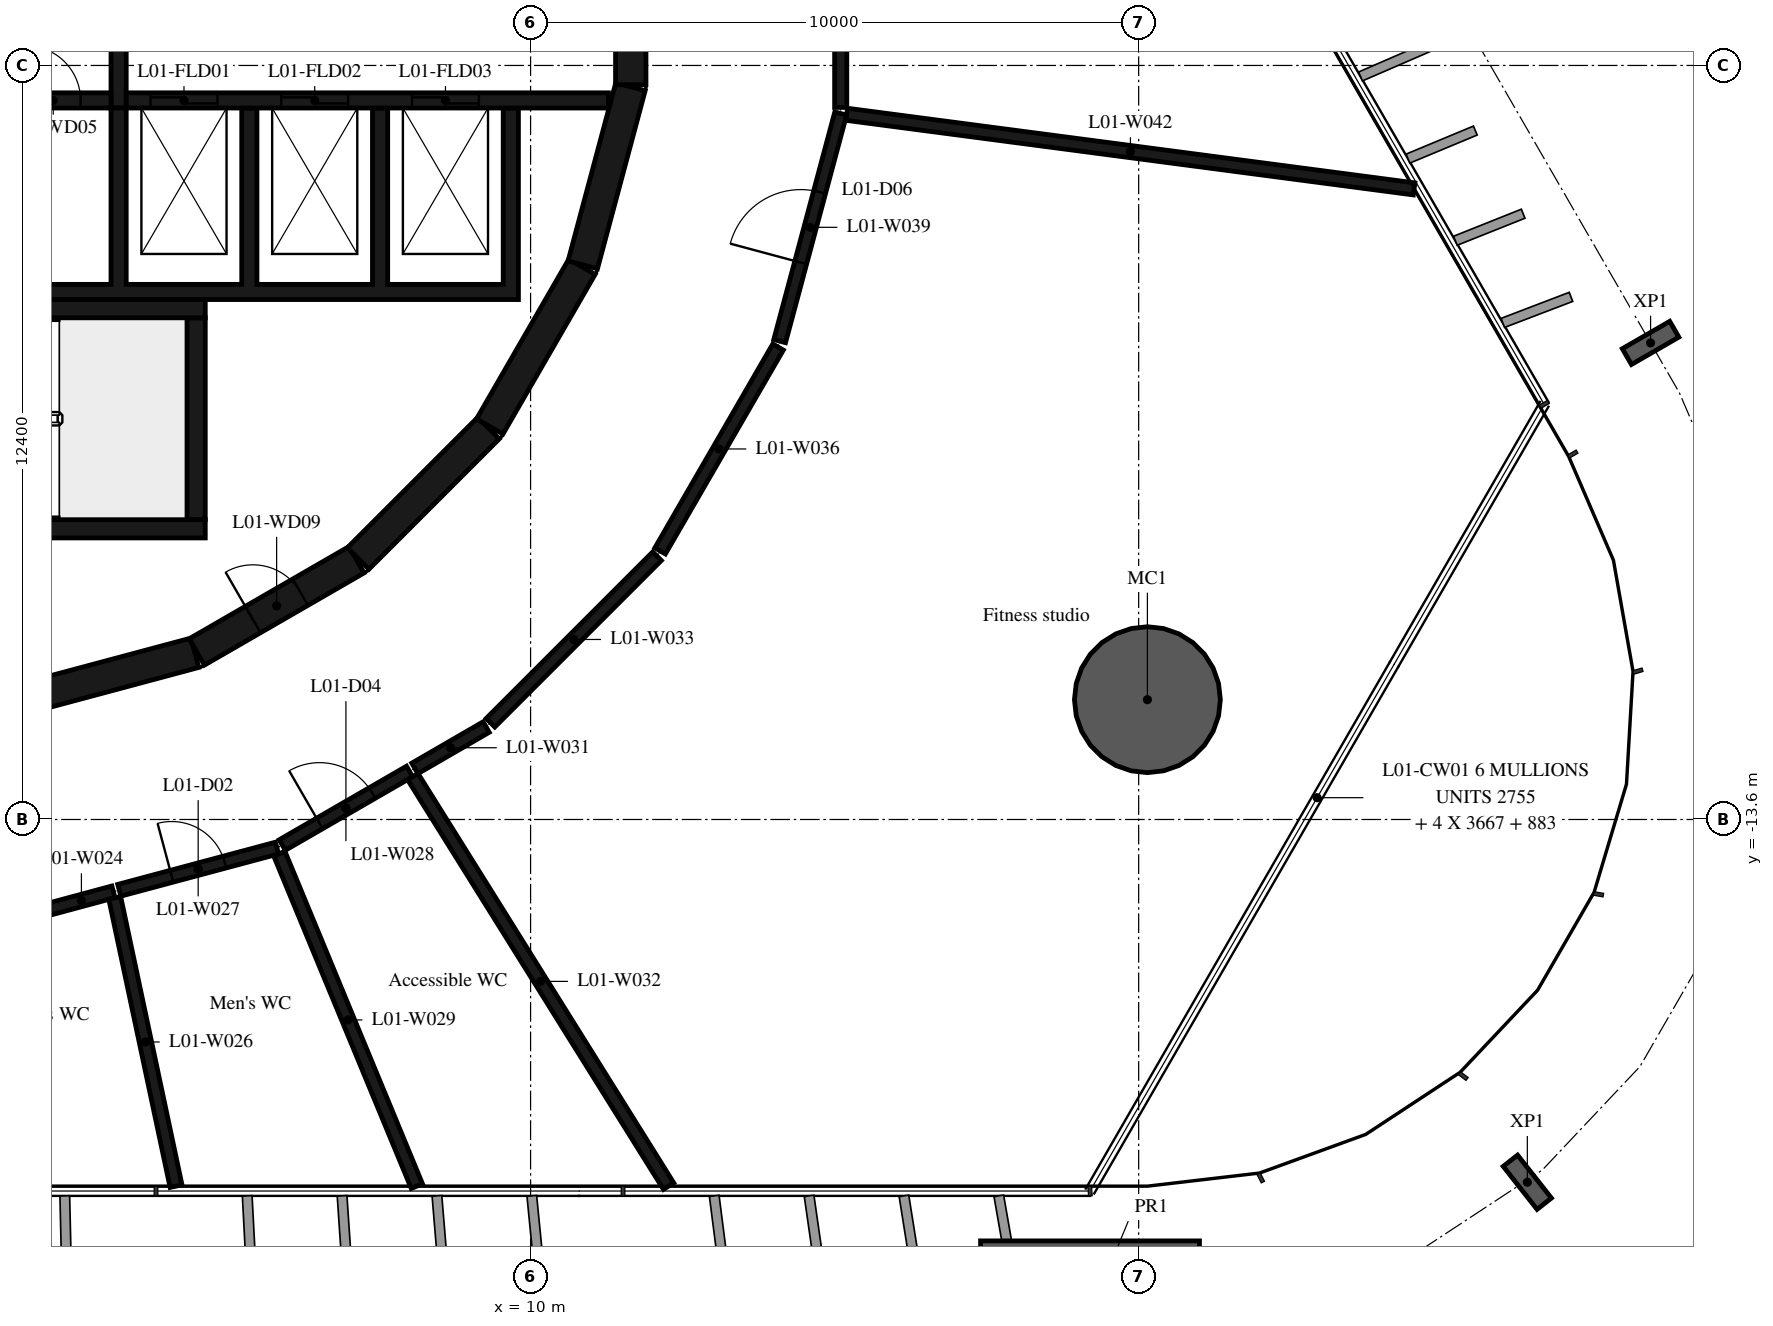
"""IFC4 building model, lengths in metres.
Left out: names, types, materials, properties, quantities, classifications, styles, units other than length and angle.
Written with IfcOpenShell. Run it as: python <this file> out.ifc"""

import sys

from ifc_helpers import new_model, si_unit, direction, frame, frame_2d, origin, origin_2d, place, context, subcontext, project, spatial, polyline, rectangle, hollow_circle, i_section, outline, extrude, element, fill, save


model = new_model("IFC4")
c1 = context("Model", 3, precision=1e-05, world=origin(), true_north=direction((0.0, 1.0)))
c2 = subcontext(c1, "Body", "Model", "MODEL_VIEW")
j1 = project(units=[si_unit("LENGTHUNIT", "METRE"), si_unit("PLANEANGLEUNIT", "RADIAN")], contexts=[c1])
p1 = place(None, origin())
s1 = spatial("IfcSite", under=j1, at=p1, CompositionType="ELEMENT")
p2 = place(p1, origin())
s2 = spatial("IfcBuilding", under=s1, at=p2, CompositionType="ELEMENT")
p3 = place(p2, frame((0.0, 0.0, 9.0)))
s3 = spatial("IfcBuildingStorey", under=s2, at=p3, CompositionType="ELEMENT", Elevation=9.0)
p4 = place(p3, frame((20.144, -11.63, -0.38), z_axis=(0.0, 0.0, 1.0), x_axis=(1.0, 0.0, 0.0)))
e1 = element("IfcColumn", 1, at=p4, inside=s3, PredefinedType="COLUMN", context=c2, shape_type="SweptSolid", body=[
    extrude(hollow_circle(Radius=1.2, WallThickness=0.06, at=origin_2d()), origin(), (0.0, 0.0, 1.0), 4.8),
])
for number, where, z_axis, x_axis in (
    (2, (26.392, -19.565, -0.38), (0.0, 0.0, 1.0), (-0.786, -0.619, 0.0)),
    (3, (28.419, -5.763, -0.38), (0.0, 0.0, 1.0), (0.5, -0.866, 0.0)),
):
    element("IfcColumn", number, at=place(p3, frame(where, z_axis=z_axis, x_axis=x_axis)), inside=s3, PredefinedType="COLUMN", context=c2, shape_type="SweptSolid", body=[
        extrude(i_section(OverallWidth=0.3, OverallDepth=0.9, WebThickness=0.019, FlangeThickness=0.035, FilletRadius=0.03, at=origin_2d()), origin(), (0.0, 0.0, 1.0), 4.8),
    ])
p5 = place(p3, frame((19.2, -21.73, -0.38), z_axis=(0.0, 0.0, 1.0), x_axis=(1.0, 0.0, 0.0)))
e4 = element("IfcColumn", 4, at=p5, inside=s3, PredefinedType="COLUMN", context=c2, shape_type="SweptSolid", body=[
    extrude(rectangle(XDim=3.6, YDim=2.4, at=origin_2d()), origin(), (0.0, 0.0, 1.0), 4.8),
])
p6 = place(p3, frame((1.55, -11.643, 0.0), z_axis=(0.0, 0.0, 1.0), x_axis=(0.965948410781, 0.258734743916, 0.0)))
e5 = element("IfcWall", 5, at=p6, inside=s3, PredefinedType="SHEAR", context=c2, shape_type="SweptSolid", body=[
    extrude(rectangle(XDim=3.033, YDim=0.5, at=frame_2d((1.516, 0.0))), origin(), (0.0, 0.0, 1.0), 4.42),
])
p7 = place(p3, frame((4.51, -10.845, 0.0), z_axis=(0.0, 0.0, 1.0), x_axis=(0.865975092491, 0.500087131594, 0.0)))
e6 = element("IfcWall", 6, at=p7, inside=s3, PredefinedType="SHEAR", context=c2, shape_type="SweptSolid", body=[
    extrude(rectangle(XDim=3.033, YDim=0.5, at=frame_2d((1.516, 0.0))), origin(), (0.0, 0.0, 1.0), 4.42),
])
p8 = place(p7, frame((1.066, 0.0, 0.0)))
e7 = element("IfcOpeningElement", 7, at=p8, cuts=e6, PredefinedType="OPENING", context=c2, shape_type="SweptSolid", body=[
    extrude(rectangle(XDim=0.9, YDim=2.1, at=frame_2d((0.45, 1.05))), frame((0.0, 0.26, 0.0), z_axis=(0.0, -1.0, 0.0), x_axis=(1.0, 0.0, 0.0)), (0.0, 0.0, 1.0), 0.52),
])
p9 = place(p3, frame((7.164, -9.308, 0.0), z_axis=(0.0, 0.0, 1.0), x_axis=(0.707106781187, 0.707106781187, 0.0)))
e8 = element("IfcWall", 8, at=p9, inside=s3, PredefinedType="SHEAR", context=c2, shape_type="SweptSolid", body=[
    extrude(rectangle(XDim=3.032, YDim=0.5, at=frame_2d((1.516, 0.0))), origin(), (0.0, 0.0, 1.0), 4.42),
])
for number, where, z_axis, x_axis in (
    (9, (9.329, -7.137, 0.0), (0.0, 0.0, 1.0), (0.5, 0.866, 0.0)),
    (10, (10.858, -4.479, 0.0), (0.0, 0.0, 1.0), (0.259, 0.966, 0.0)),
):
    element("IfcWall", number, at=place(p3, frame(where, z_axis=z_axis, x_axis=x_axis)), inside=s3, PredefinedType="SHEAR", context=c2, shape_type="SweptSolid", body=[
        extrude(rectangle(XDim=3.033, YDim=0.5, at=frame_2d((1.516, 0.0))), origin(), (0.0, 0.0, 1.0), 4.42),
    ])
p10 = place(p3, frame((11.647, -1.516, 0.0), z_axis=(0.0, 0.0, 1.0), x_axis=(0.0, 1.0, 0.0)))
e11 = element("IfcWall", 11, at=p10, inside=s3, PredefinedType="SHEAR", context=c2, shape_type="SweptSolid", body=[
    extrude(rectangle(XDim=3.033, YDim=0.5, at=frame_2d((1.516, 0.0))), origin(), (0.0, 0.0, 1.0), 4.42),
])
p11 = place(p10, frame((0.616, 0.0, 0.0)))
e12 = element("IfcOpeningElement", 12, at=p11, cuts=e11, PredefinedType="OPENING", context=c2, shape_type="SweptSolid", body=[
    extrude(rectangle(XDim=1.8, YDim=2.1, at=frame_2d((0.9, 1.05))), frame((0.0, 0.26, 0.0), z_axis=(0.0, -1.0, 0.0), x_axis=(1.0, 0.0, 0.0)), (0.0, 0.0, 1.0), 0.52),
])
p12 = place(p3, frame((-2.4, -5.2, 0.0), z_axis=(0.0, 0.0, 1.0), x_axis=(1.0, 0.0, 0.0)))
e13 = element("IfcWall", 13, at=p12, inside=s3, PredefinedType="SHEAR", context=c2, shape_type="SweptSolid", body=[
    extrude(rectangle(XDim=7.05, YDim=0.3, at=frame_2d((3.525, 0.0))), origin(), (0.0, 0.0, 1.0), 4.42),
])
p13 = place(p3, frame((4.5, -8.67, 0.0), z_axis=(0.0, 0.0, 1.0), x_axis=(0.0, 1.0, 0.0)))
e14 = element("IfcWall", 14, at=p13, inside=s3, PredefinedType="SHEAR", context=c2, shape_type="SweptSolid", body=[
    extrude(rectangle(XDim=3.32, YDim=0.3, at=frame_2d((1.66, 0.0))), origin(), (0.0, 0.0, 1.0), 4.42),
])
p14 = place(p3, frame((0.1, -8.82, 0.0), z_axis=(0.0, 0.0, 1.0), x_axis=(1.0, 0.0, 0.0)))
e15 = element("IfcWall", 15, at=p14, inside=s3, PredefinedType="SHEAR", context=c2, shape_type="SweptSolid", body=[
    extrude(rectangle(XDim=4.55, YDim=0.3, at=frame_2d((2.275, 0.0))), origin(), (0.0, 0.0, 1.0), 4.42),
])
p15 = place(p3, origin())
e16 = element("IfcWall", 16, at=p15, inside=s3, PredefinedType="SHEAR", context=c2, shape_type="SweptSolid", body=[
    extrude(outline(polyline([(9.8, -5.05), (9.8, -4.8), (9.8, -1.9), (9.55, -1.9), (9.55, -4.8), (7.65, -4.8), (7.65, -1.9), (7.4, -1.9), (7.4, -4.8), (5.5, -4.8), (5.5, -1.9), (5.25, -1.9), (5.25, -4.8), (3.35, -4.8), (3.35, -1.9), (3.1, -1.9), (3.1, -4.8), (1.2, -4.8), (1.2, -1.9), (0.95, -1.9), (0.95, -4.8), (-0.95, -4.8), (-0.95, -1.9), (-1.2, -1.9), (-1.2, -4.8), (-5.25, -4.8), (-5.25, -1.9), (-5.5, -1.9), (-5.5, -4.8), (-7.4, -4.8), (-7.4, -1.9), (-7.65, -1.9), (-7.65, -4.8), (-9.55, -4.8), (-9.55, -1.9), (-9.8, -1.9), (-9.8, -4.8), (-9.8, -5.05), (9.8, -5.05)])), origin(), (0.0, 0.0, 1.0), 4.42),
])
p16 = place(p3, frame((-11.28, -1.775, 0.0), z_axis=(0.0, 0.0, 1.0), x_axis=(1.0, 0.0, 0.0)))
e17 = element("IfcWall", 17, at=p16, inside=s3, PredefinedType="SHEAR", context=c2, shape_type="SweptSolid", body=[
    extrude(rectangle(XDim=14.38, YDim=0.25, at=frame_2d((7.19, 0.0))), origin(), (0.0, 0.0, 1.0), 4.42),
])
p17 = place(p16, frame((7.605, 0.0, 0.0)))
e18 = element("IfcOpeningElement", 18, at=p17, cuts=e17, PredefinedType="OPENING", context=c2, shape_type="SweptSolid", body=[
    extrude(rectangle(XDim=0.9, YDim=2.1, at=frame_2d((0.45, 1.05))), frame((0.0, 0.135, 0.0), z_axis=(0.0, -1.0, 0.0), x_axis=(1.0, 0.0, 0.0)), (0.0, 0.0, 1.0), 0.27),
])
p18 = place(p16, frame((10.83, 0.0, 0.0)))
e19 = element("IfcOpeningElement", 19, at=p18, cuts=e17, PredefinedType="OPENING", context=c2, shape_type="SweptSolid", body=[
    extrude(rectangle(XDim=0.9, YDim=2.1, at=frame_2d((0.45, 1.05))), frame((0.0, 0.135, 0.0), z_axis=(0.0, -1.0, 0.0), x_axis=(1.0, 0.0, 0.0)), (0.0, 0.0, 1.0), 0.27),
])
p19 = place(p16, frame((12.98, 0.0, 0.0)))
e20 = element("IfcOpeningElement", 20, at=p19, cuts=e17, PredefinedType="OPENING", context=c2, shape_type="SweptSolid", body=[
    extrude(rectangle(XDim=0.9, YDim=2.1, at=frame_2d((0.45, 1.05))), frame((0.0, 0.135, 0.0), z_axis=(0.0, -1.0, 0.0), x_axis=(1.0, 0.0, 0.0)), (0.0, 0.0, 1.0), 0.27),
])
p20 = place(p3, frame((3.35, -1.775, 0.0), z_axis=(0.0, 0.0, 1.0), x_axis=(1.0, 0.0, 0.0)))
e21 = element("IfcWall", 21, at=p20, inside=s3, PredefinedType="SHEAR", context=c2, shape_type="SweptSolid", body=[
    extrude(rectangle(XDim=7.93, YDim=0.25, at=frame_2d((3.965, 0.0))), origin(), (0.0, 0.0, 1.0), 4.42),
])
p21 = place(p20, frame((0.4, 0.0, 0.0)))
e22 = element("IfcOpeningElement", 22, at=p21, cuts=e21, PredefinedType="OPENING", context=c2, shape_type="SweptSolid", body=[
    extrude(rectangle(XDim=1.1, YDim=2.4, at=frame_2d((0.55, 1.2))), frame((0.0, 0.135, 0.0), z_axis=(0.0, -1.0, 0.0), x_axis=(1.0, 0.0, 0.0)), (0.0, 0.0, 1.0), 0.27),
])
p22 = place(p20, frame((2.55, 0.0, 0.0)))
e23 = element("IfcOpeningElement", 23, at=p22, cuts=e21, PredefinedType="OPENING", context=c2, shape_type="SweptSolid", body=[
    extrude(rectangle(XDim=1.1, YDim=2.4, at=frame_2d((0.55, 1.2))), frame((0.0, 0.135, 0.0), z_axis=(0.0, -1.0, 0.0), x_axis=(1.0, 0.0, 0.0)), (0.0, 0.0, 1.0), 0.27),
])
p23 = place(p20, frame((4.7, 0.0, 0.0)))
e24 = element("IfcOpeningElement", 24, at=p23, cuts=e21, PredefinedType="OPENING", context=c2, shape_type="SweptSolid", body=[
    extrude(rectangle(XDim=1.1, YDim=2.4, at=frame_2d((0.55, 1.2))), frame((0.0, 0.135, 0.0), z_axis=(0.0, -1.0, 0.0), x_axis=(1.0, 0.0, 0.0)), (0.0, 0.0, 1.0), 0.27),
])
p24 = place(p3, frame((3.225, -1.9, 0.0), z_axis=(0.0, 0.0, 1.0), x_axis=(0.0, 1.0, 0.0)))
e25 = element("IfcWall", 25, at=p24, inside=s3, PredefinedType="SHEAR", context=c2, shape_type="SweptSolid", body=[
    extrude(rectangle(XDim=3.8, YDim=0.25, at=frame_2d((1.9, 0.0))), origin(), (0.0, 0.0, 1.0), 4.42),
])
p25 = place(p3, frame((2.087, -15.074, 0.0), z_axis=(0.0, 0.0, 1.0), x_axis=(0.965529267024, 0.260294514963, 0.0)))
e26 = element("IfcWall", 26, at=p25, inside=s3, PredefinedType="PARTITIONING", context=c2, shape_type="SweptSolid", body=[
    extrude(rectangle(XDim=1.091, YDim=0.2, at=frame_2d((0.545, 0.0))), origin(), (0.0, 0.0, 1.0), 4.42),
])
p26 = place(p3, frame((3.161, -14.888, 0.0), z_axis=(0.0, 0.0, 1.0), x_axis=(0.208118919353, -0.978103530005, 0.0)))
e27 = element("IfcWall", 27, at=p26, inside=s3, PredefinedType="PARTITIONING", context=c2, shape_type="SweptSolid", body=[
    extrude(rectangle(XDim=4.848, YDim=0.2, at=frame_2d((2.424, 0.0))), origin(), (0.0, 0.0, 1.0), 4.42),
])
p27 = place(p3, frame((3.237, -14.764, 0.0), z_axis=(0.0, 0.0, 1.0), x_axis=(0.966003629213, 0.25852850587, 0.0)))
e28 = element("IfcWall", 28, at=p27, inside=s3, PredefinedType="PARTITIONING", context=c2, shape_type="SweptSolid", body=[
    extrude(rectangle(XDim=2.685, YDim=0.2, at=frame_2d((1.342, 0.0))), origin(), (0.0, 0.0, 1.0), 4.42),
])
p28 = place(p27, frame((0.892, 0.0, 0.0)))
e29 = element("IfcOpeningElement", 29, at=p28, cuts=e28, PredefinedType="OPENING", context=c2, shape_type="SweptSolid", body=[
    extrude(rectangle(XDim=0.9, YDim=2.1, at=frame_2d((0.45, 1.05))), frame((0.0, 0.11, 0.0), z_axis=(0.0, -1.0, 0.0), x_axis=(1.0, 0.0, 0.0)), (0.0, 0.0, 1.0), 0.22),
])
p29 = place(p3, frame((5.917, -14.02, 0.0), z_axis=(0.0, 0.0, 1.0), x_axis=(0.865797030805, 0.500395345151, 0.0)))
e30 = element("IfcWall", 30, at=p29, inside=s3, PredefinedType="PARTITIONING", context=c2, shape_type="SweptSolid", body=[
    extrude(rectangle(XDim=2.418, YDim=0.2, at=frame_2d((1.209, 0.0))), origin(), (0.0, 0.0, 1.0), 4.42),
])
p30 = place(p29, frame((0.709, 0.0, 0.0)))
e31 = element("IfcOpeningElement", 31, at=p30, cuts=e30, PredefinedType="OPENING", context=c2, shape_type="SweptSolid", body=[
    extrude(rectangle(XDim=1.0, YDim=2.1, at=frame_2d((0.5, 1.05))), frame((0.0, 0.11, 0.0), z_axis=(0.0, -1.0, 0.0), x_axis=(1.0, 0.0, 0.0)), (0.0, 0.0, 1.0), 0.22),
])
p31 = place(p3, frame((5.868, -14.162, 0.0), z_axis=(0.0, 0.0, 1.0), x_axis=(0.382249745869, -0.924059052108, 0.0)))
e32 = element("IfcWall", 32, at=p31, inside=s3, PredefinedType="PARTITIONING", context=c2, shape_type="SweptSolid", body=[
    extrude(rectangle(XDim=5.917, YDim=0.2, at=frame_2d((2.958, 0.0))), origin(), (0.0, 0.0, 1.0), 4.42),
])
p32 = place(p3, frame((8.096, -12.76, 0.0), z_axis=(0.0, 0.0, 1.0), x_axis=(0.865348217229, 0.501171091484, 0.0)))
e33 = element("IfcWall", 33, at=p32, inside=s3, PredefinedType="PARTITIONING", context=c2, shape_type="SweptSolid", body=[
    extrude(rectangle(XDim=1.356, YDim=0.2, at=frame_2d((0.678, 0.0))), origin(), (0.0, 0.0, 1.0), 4.42),
])
p33 = place(p3, frame((8.063, -12.895, 0.0), z_axis=(0.0, 0.0, 1.0), x_axis=(0.529780605496, -0.848134723992, 0.0)))
e34 = element("IfcWall", 34, at=p33, inside=s3, PredefinedType="PARTITIONING", context=c2, shape_type="SweptSolid", body=[
    extrude(rectangle(XDim=7.941, YDim=0.2, at=frame_2d((3.971, 0.0))), origin(), (0.0, 0.0, 1.0), 4.42),
])
p34 = place(p3, frame((9.341, -12.009, 0.0), z_axis=(0.0, 0.0, 1.0), x_axis=(0.707106781187, 0.707106781187, 0.0)))
e35 = element("IfcWall", 35, at=p34, inside=s3, PredefinedType="PARTITIONING", context=c2, shape_type="SweptSolid", body=[
    extrude(rectangle(XDim=3.874, YDim=0.2, at=frame_2d((1.937, 0.0))), origin(), (0.0, 0.0, 1.0), 4.42),
])
p35 = place(p3, frame((12.13, -9.183, 0.0), z_axis=(0.0, 0.0, 1.0), x_axis=(0.500760497952, 0.865585884642, 0.0)))
e36 = element("IfcWall", 36, at=p35, inside=s3, PredefinedType="PARTITIONING", context=c2, shape_type="SweptSolid", body=[
    extrude(rectangle(XDim=3.874, YDim=0.2, at=frame_2d((1.937, 0.0))), origin(), (0.0, 0.0, 1.0), 4.42),
])
p36 = place(p3, frame((14.096, -5.733, 0.0), z_axis=(0.0, 0.0, 1.0), x_axis=(0.259085569159, 0.96585437197, 0.0)))
e37 = element("IfcWall", 37, at=p36, inside=s3, PredefinedType="PARTITIONING", context=c2, shape_type="SweptSolid", body=[
    extrude(rectangle(XDim=3.876, YDim=0.2, at=frame_2d((1.938, 0.0))), origin(), (0.0, 0.0, 1.0), 4.42),
])
p37 = place(p36, frame((1.338, 0.0, 0.0)))
e38 = element("IfcOpeningElement", 38, at=p37, cuts=e37, PredefinedType="OPENING", context=c2, shape_type="SweptSolid", body=[
    extrude(rectangle(XDim=1.2, YDim=2.1, at=frame_2d((0.6, 1.05))), frame((0.0, 0.11, 0.0), z_axis=(0.0, -1.0, 0.0), x_axis=(1.0, 0.0, 0.0)), (0.0, 0.0, 1.0), 0.22),
])
p38 = place(p3, frame((15.1, -1.89, 0.0), z_axis=(0.0, 0.0, 1.0), x_axis=(0.0, 1.0, 0.0)))
e39 = element("IfcWall", 39, at=p38, inside=s3, PredefinedType="PARTITIONING", context=c2, shape_type="SweptSolid", body=[
    extrude(rectangle(XDim=3.88, YDim=0.2, at=frame_2d((1.94, 0.0))), origin(), (0.0, 0.0, 1.0), 4.42),
])
p39 = place(p38, frame((1.34, 0.0, 0.0)))
e40 = element("IfcOpeningElement", 40, at=p39, cuts=e39, PredefinedType="OPENING", context=c2, shape_type="SweptSolid", body=[
    extrude(rectangle(XDim=1.2, YDim=2.1, at=frame_2d((0.6, 1.05))), frame((0.0, 0.11, 0.0), z_axis=(0.0, -1.0, 0.0), x_axis=(1.0, 0.0, 0.0)), (0.0, 0.0, 1.0), 0.22),
])
p40 = place(p3, frame((15.199, -2.003, 0.0), z_axis=(0.0, 0.0, 1.0), x_axis=(0.991463740717, -0.130382709146, 0.0)))
e41 = element("IfcWall", 41, at=p40, inside=s3, PredefinedType="PARTITIONING", context=c2, shape_type="SweptSolid", body=[
    extrude(rectangle(XDim=9.411, YDim=0.2, at=frame_2d((4.706, 0.0))), origin(), (0.0, 0.0, 1.0), 4.42),
])
p41 = place(p21, origin())
e42 = element("IfcDoor", 42, at=p41, inside=s3, OperationType="DOUBLE_DOOR_SLIDING", PredefinedType="DOOR", context=c2, shape_type="SweptSolid", body=[
    extrude(rectangle(XDim=1.1, YDim=2.4, at=frame_2d((0.55, 1.2))), frame((0.0, 0.025, 0.0), z_axis=(0.0, -1.0, 0.0), x_axis=(1.0, 0.0, 0.0)), (0.0, 0.0, 1.0), 0.05),
])
fill(e22, e42)
p42 = place(p22, origin())
e43 = element("IfcDoor", 43, at=p42, inside=s3, OperationType="DOUBLE_DOOR_SLIDING", PredefinedType="DOOR", context=c2, shape_type="SweptSolid", body=[
    extrude(rectangle(XDim=1.1, YDim=2.4, at=frame_2d((0.55, 1.2))), frame((0.0, 0.025, 0.0), z_axis=(0.0, -1.0, 0.0), x_axis=(1.0, 0.0, 0.0)), (0.0, 0.0, 1.0), 0.05),
])
fill(e23, e43)
p43 = place(p23, origin())
e44 = element("IfcDoor", 44, at=p43, inside=s3, OperationType="DOUBLE_DOOR_SLIDING", PredefinedType="DOOR", context=c2, shape_type="SweptSolid", body=[
    extrude(rectangle(XDim=1.1, YDim=2.4, at=frame_2d((0.55, 1.2))), frame((0.0, 0.025, 0.0), z_axis=(0.0, -1.0, 0.0), x_axis=(1.0, 0.0, 0.0)), (0.0, 0.0, 1.0), 0.05),
])
fill(e24, e44)
p44 = place(p19, origin())
e45 = element("IfcDoor", 45, at=p44, inside=s3, OperationType="SINGLE_SWING_RIGHT", PredefinedType="DOOR", context=c2, shape_type="SweptSolid", body=[
    extrude(rectangle(XDim=0.9, YDim=2.1, at=frame_2d((0.45, 1.05))), frame((0.0, 0.025, 0.0), z_axis=(0.0, -1.0, 0.0), x_axis=(1.0, 0.0, 0.0)), (0.0, 0.0, 1.0), 0.05),
])
fill(e20, e45)
p45 = place(p8, origin())
e46 = element("IfcDoor", 46, at=p45, inside=s3, OperationType="SINGLE_SWING_RIGHT", PredefinedType="DOOR", context=c2, shape_type="SweptSolid", body=[
    extrude(rectangle(XDim=0.9, YDim=2.1, at=frame_2d((0.45, 1.05))), frame((0.0, 0.025, 0.0), z_axis=(0.0, -1.0, 0.0), x_axis=(1.0, 0.0, 0.0)), (0.0, 0.0, 1.0), 0.05),
])
fill(e7, e46)
p46 = place(p28, origin())
e47 = element("IfcDoor", 47, at=p46, inside=s3, OperationType="SINGLE_SWING_LEFT", PredefinedType="DOOR", context=c2, shape_type="SweptSolid", body=[
    extrude(rectangle(XDim=0.9, YDim=2.1, at=frame_2d((0.45, 1.05))), frame((0.0, 0.025, 0.0), z_axis=(0.0, -1.0, 0.0), x_axis=(1.0, 0.0, 0.0)), (0.0, 0.0, 1.0), 0.05),
])
fill(e29, e47)
p47 = place(p30, origin())
e48 = element("IfcDoor", 48, at=p47, inside=s3, OperationType="SINGLE_SWING_LEFT", PredefinedType="DOOR", context=c2, shape_type="SweptSolid", body=[
    extrude(rectangle(XDim=1.0, YDim=2.1, at=frame_2d((0.5, 1.05))), frame((0.0, 0.025, 0.0), z_axis=(0.0, -1.0, 0.0), x_axis=(1.0, 0.0, 0.0)), (0.0, 0.0, 1.0), 0.05),
])
fill(e31, e48)
p48 = place(p37, origin())
e49 = element("IfcDoor", 49, at=p48, inside=s3, OperationType="SINGLE_SWING_LEFT", PredefinedType="DOOR", context=c2, shape_type="SweptSolid", body=[
    extrude(rectangle(XDim=1.2, YDim=2.1, at=frame_2d((0.6, 1.05))), frame((0.0, 0.025, 0.0), z_axis=(0.0, -1.0, 0.0), x_axis=(1.0, 0.0, 0.0)), (0.0, 0.0, 1.0), 0.05),
])
fill(e38, e49)
save(model, sys.argv[1])
